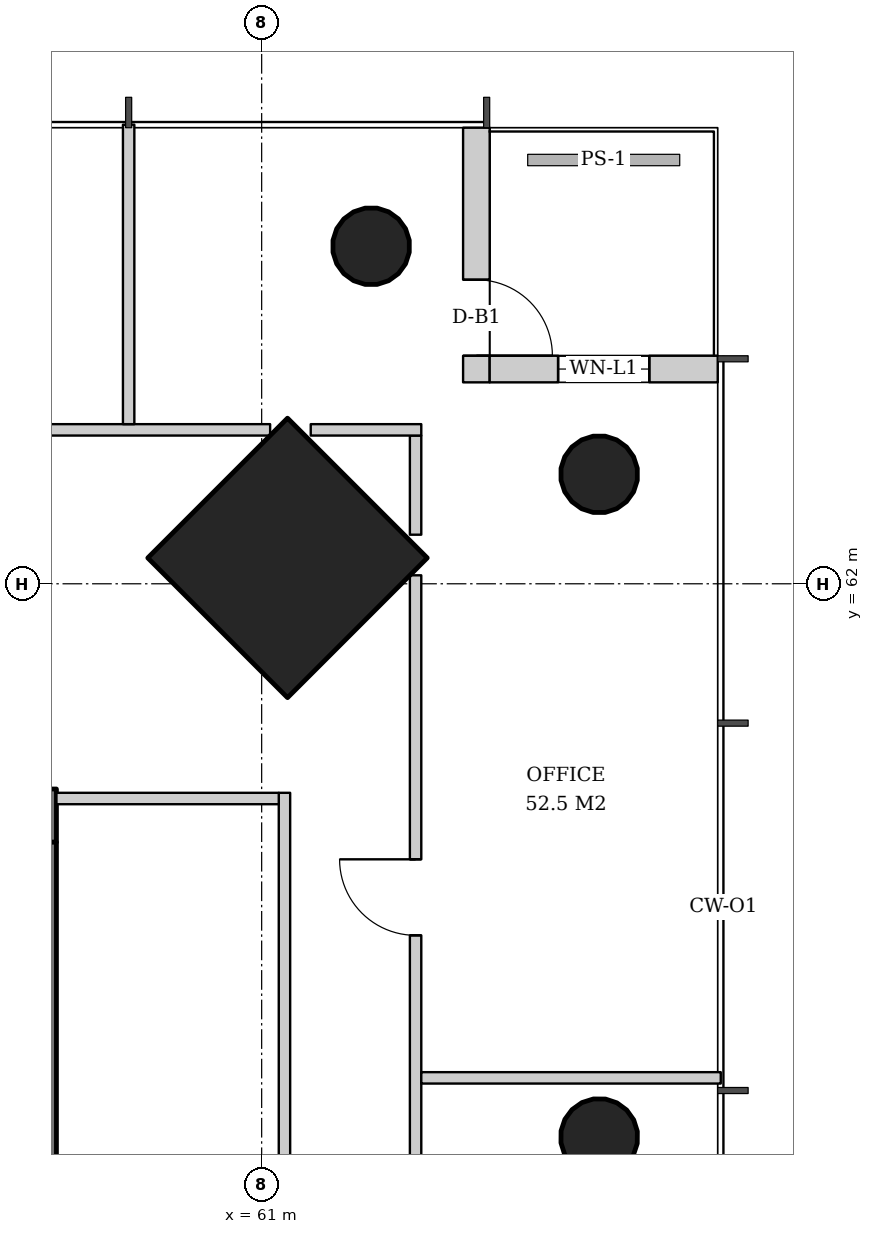
"""IFC4 building model, lengths in metres.
Left out: names, types, materials, properties, quantities, classifications, styles, units other than length and angle.
Written with IfcOpenShell. Run it as: python <this file> out.ifc"""

import sys

from ifc_helpers import new_model, si_unit, direction, frame, frame_2d, origin, origin_2d, place, context, subcontext, project, spatial, rectangle, hollow_circle, extrude, element, fill, save


model = new_model("IFC4")
c1 = context("Model", 3, precision=1e-05, world=origin(), true_north=direction((0.0, 1.0)))
c2 = subcontext(c1, "Body", "Model", "MODEL_VIEW")
j1 = project(units=[si_unit("LENGTHUNIT", "METRE"), si_unit("PLANEANGLEUNIT", "RADIAN")], contexts=[c1])
p1 = place(None, origin())
s1 = spatial("IfcSite", under=j1, at=p1, CompositionType="ELEMENT")
p2 = place(p1, origin())
s2 = spatial("IfcBuilding", under=s1, at=p2, CompositionType="ELEMENT")
p3 = place(p2, frame((0.0, 0.0, 131.2)))
s3 = spatial("IfcBuildingStorey", under=s2, at=p3, CompositionType="ELEMENT", Elevation=131.2)
p4 = place(p3, frame((61.379, 62.379, 0.0), z_axis=(-0.031962158256, -0.031962158256, 0.998977898093), x_axis=(0.707106781187, -0.707106781187, 0.0)))
e1 = element("IfcColumn", 1, at=p4, inside=s3, PredefinedType="COLUMN", context=c2, shape_type="SweptSolid", body=[
    extrude(rectangle(XDim=2.6, YDim=2.6, at=origin_2d()), origin(), (0.0, 0.0, 1.0), 3.804),
])
p5 = place(p3, frame((65.479, 63.479, 0.0), z_axis=(-0.031898107953, -0.031898107953, 0.998981992539), x_axis=(0.707106781187, -0.707106781187, 0.0)))
e2 = element("IfcColumn", 2, at=p5, inside=s3, PredefinedType="COLUMN", context=c2, shape_type="SweptSolid", body=[
    extrude(hollow_circle(Radius=0.508, WallThickness=0.04, at=origin_2d()), origin(), (0.0, 0.0, 1.0), 3.804),
])
p6 = place(p3, frame((65.479, 54.739, 0.0), z_axis=(-0.031910269556, -0.015987237665, 0.999362868496), x_axis=(0.447933021895, -0.894067115991, 0.0)))
e3 = element("IfcColumn", 3, at=p6, inside=s3, PredefinedType="COLUMN", context=c2, shape_type="SweptSolid", body=[
    extrude(hollow_circle(Radius=0.508, WallThickness=0.04, at=origin_2d()), origin(), (0.0, 0.0, 1.0), 3.802),
])
p7 = place(p3, frame((62.479, 66.479, 0.0), z_axis=(-0.031898107953, -0.031898107953, 0.998981992539), x_axis=(0.707106781187, -0.707106781187, 0.0)))
e4 = element("IfcColumn", 4, at=p7, inside=s3, PredefinedType="COLUMN", context=c2, shape_type="SweptSolid", body=[
    extrude(hollow_circle(Radius=0.508, WallThickness=0.04, at=origin_2d()), origin(), (0.0, 0.0, 1.0), 3.804),
])
p8 = place(p3, frame((31.7, 58.95, 0.0), z_axis=(0.0, 0.0, 1.0), x_axis=(1.0, 0.0, 0.0)))
e5 = element("IfcWall", 5, at=p8, inside=s3, PredefinedType="SHEAR", context=c2, shape_type="SweptSolid", body=[
    extrude(rectangle(XDim=26.6, YDim=0.7, at=frame_2d((13.3, 0.0))), origin(), (0.0, 0.0, 1.0), 3.8),
])
p9 = place(p8, frame((17.94, 0.0, 0.0)))
e6 = element("IfcOpeningElement", 6, at=p9, cuts=e5, PredefinedType="OPENING", context=c2, shape_type="SweptSolid", body=[
    extrude(rectangle(XDim=1.0, YDim=2.1, at=frame_2d((0.5, 1.05))), frame((0.0, 0.36, 0.0), z_axis=(0.0, -1.0, 0.0), x_axis=(1.0, 0.0, 0.0)), (0.0, 0.0, 1.0), 0.72),
])
p10 = place(p8, frame((5.825, 0.0, 0.0)))
e7 = element("IfcOpeningElement", 7, at=p10, cuts=e5, PredefinedType="OPENING", context=c2, shape_type="SweptSolid", body=[
    extrude(rectangle(XDim=1.0, YDim=2.1, at=frame_2d((0.5, 1.05))), frame((0.0, 0.36, 0.0), z_axis=(0.0, -1.0, 0.0), x_axis=(1.0, 0.0, 0.0)), (0.0, 0.0, 1.0), 0.72),
])
p11 = place(p8, frame((1.169, 0.0, 0.0)))
e8 = element("IfcOpeningElement", 8, at=p11, cuts=e5, PredefinedType="OPENING", context=c2, shape_type="SweptSolid", body=[
    extrude(rectangle(XDim=1.0, YDim=2.1, at=frame_2d((0.5, 1.05))), frame((0.0, 0.36, 0.0), z_axis=(0.0, -1.0, 0.0), x_axis=(1.0, 0.0, 0.0)), (0.0, 0.0, 1.0), 0.72),
])
p12 = place(p8, frame((3.447, 0.0, 0.0)))
e9 = element("IfcOpeningElement", 9, at=p12, cuts=e5, PredefinedType="OPENING", context=c2, shape_type="SweptSolid", body=[
    extrude(rectangle(XDim=1.0, YDim=2.1, at=frame_2d((0.5, 1.05))), frame((0.0, 0.36, 0.0), z_axis=(0.0, -1.0, 0.0), x_axis=(1.0, 0.0, 0.0)), (0.0, 0.0, 1.0), 0.72),
])
p13 = place(p8, frame((8.342, 0.0, 0.0)))
e10 = element("IfcOpeningElement", 10, at=p13, cuts=e5, PredefinedType="OPENING", context=c2, shape_type="SweptSolid", body=[
    extrude(rectangle(XDim=1.0, YDim=2.1, at=frame_2d((0.5, 1.05))), frame((0.0, 0.36, 0.0), z_axis=(0.0, -1.0, 0.0), x_axis=(1.0, 0.0, 0.0)), (0.0, 0.0, 1.0), 0.72),
])
p14 = place(p8, frame((11.626, 0.0, 0.0)))
e11 = element("IfcOpeningElement", 11, at=p14, cuts=e5, PredefinedType="OPENING", context=c2, shape_type="SweptSolid", body=[
    extrude(rectangle(XDim=1.0, YDim=2.1, at=frame_2d((0.5, 1.05))), frame((0.0, 0.36, 0.0), z_axis=(0.0, -1.0, 0.0), x_axis=(1.0, 0.0, 0.0)), (0.0, 0.0, 1.0), 0.72),
])
p15 = place(p8, frame((14.862, 0.0, 0.0)))
e12 = element("IfcOpeningElement", 12, at=p15, cuts=e5, PredefinedType="OPENING", context=c2, shape_type="SweptSolid", body=[
    extrude(rectangle(XDim=1.0, YDim=2.1, at=frame_2d((0.5, 1.05))), frame((0.0, 0.36, 0.0), z_axis=(0.0, -1.0, 0.0), x_axis=(1.0, 0.0, 0.0)), (0.0, 0.0, 1.0), 0.72),
])
p16 = place(p8, frame((20.9, 0.0, 0.0)))
e13 = element("IfcOpeningElement", 13, at=p16, cuts=e5, PredefinedType="OPENING", context=c2, shape_type="SweptSolid", body=[
    extrude(rectangle(XDim=1.0, YDim=2.1, at=frame_2d((0.5, 1.05))), frame((0.0, 0.36, 0.0), z_axis=(0.0, -1.0, 0.0), x_axis=(1.0, 0.0, 0.0)), (0.0, 0.0, 1.0), 0.72),
])
p17 = place(p8, frame((23.75, 0.0, 0.0)))
e14 = element("IfcOpeningElement", 14, at=p17, cuts=e5, PredefinedType="OPENING", context=c2, shape_type="SweptSolid", body=[
    extrude(rectangle(XDim=1.0, YDim=2.1, at=frame_2d((0.5, 1.05))), frame((0.0, 0.36, 0.0), z_axis=(0.0, -1.0, 0.0), x_axis=(1.0, 0.0, 0.0)), (0.0, 0.0, 1.0), 0.72),
])
p18 = place(p3, frame((57.95, 33.4, 0.0), z_axis=(0.0, 0.0, 1.0), x_axis=(0.0, 1.0, 0.0)))
e15 = element("IfcWall", 15, at=p18, inside=s3, PredefinedType="SHEAR", context=c2, shape_type="SweptSolid", body=[
    extrude(rectangle(XDim=25.2, YDim=0.7, at=frame_2d((12.6, 0.0))), origin(), (0.0, 0.0, 1.0), 3.8),
])
p19 = place(p18, frame((11.7, 0.0, 0.0)))
e16 = element("IfcOpeningElement", 16, at=p19, cuts=e15, PredefinedType="OPENING", context=c2, shape_type="SweptSolid", body=[
    extrude(rectangle(XDim=1.8, YDim=2.4, at=frame_2d((0.9, 1.2))), frame((0.0, 0.36, 0.0), z_axis=(0.0, -1.0, 0.0), x_axis=(1.0, 0.0, 0.0)), (0.0, 0.0, 1.0), 0.72),
])
p20 = place(p3, frame((63.825, 68.0, 0.0), z_axis=(0.0, 0.0, 1.0), x_axis=(0.0, -1.0, 0.0)))
e17 = element("IfcWall", 17, at=p20, inside=s3, PredefinedType="SOLIDWALL", context=c2, shape_type="SweptSolid", body=[
    extrude(rectangle(XDim=3.35, YDim=0.35, at=frame_2d((1.675, 0.0))), origin(), (0.0, 0.0, 1.0), 3.62),
])
p21 = place(p20, frame((2.0, 0.0, 0.0)))
e18 = element("IfcOpeningElement", 18, at=p21, cuts=e17, PredefinedType="OPENING", context=c2, shape_type="SweptSolid", body=[
    extrude(rectangle(XDim=1.0, YDim=2.4, at=frame_2d((0.5, 1.2))), frame((0.0, 0.185, 0.0), z_axis=(0.0, -1.0, 0.0), x_axis=(1.0, 0.0, 0.0)), (0.0, 0.0, 1.0), 0.37),
])
p22 = place(p3, frame((64.0, 64.825, 0.0), z_axis=(0.0, 0.0, 1.0), x_axis=(1.0, 0.0, 0.0)))
e19 = element("IfcWall", 19, at=p22, inside=s3, PredefinedType="SOLIDWALL", context=c2, shape_type="SweptSolid", body=[
    extrude(rectangle(XDim=3.0, YDim=0.35, at=frame_2d((1.5, 0.0))), origin(), (0.0, 0.0, 1.0), 3.62),
])
p23 = place(p22, frame((0.9, 0.0, 0.6)))
e20 = element("IfcOpeningElement", 20, at=p23, cuts=e19, PredefinedType="OPENING", context=c2, shape_type="SweptSolid", body=[
    extrude(rectangle(XDim=1.2, YDim=2.55, at=frame_2d((0.6, 1.275))), frame((0.0, 0.185, 0.0), z_axis=(0.0, -1.0, 0.0), x_axis=(1.0, 0.0, 0.0)), (0.0, 0.0, 1.0), 0.37),
])
p24 = place(p3, frame((61.3, 48.025, 0.0), z_axis=(0.0, 0.0, 1.0), x_axis=(0.0, 1.0, 0.0)))
e21 = element("IfcWall", 21, at=p24, inside=s3, PredefinedType="PARTITIONING", context=c2, shape_type="SweptSolid", body=[
    extrude(rectangle(XDim=11.225, YDim=0.15, at=frame_2d((5.613, 0.0))), origin(), (0.0, 0.0, 1.0), 2.806),
])
p25 = place(p24, frame((5.113, 0.0, 0.0)))
e22 = element("IfcOpeningElement", 22, at=p25, cuts=e21, PredefinedType="OPENING", context=c2, shape_type="SweptSolid", body=[
    extrude(rectangle(XDim=1.0, YDim=2.1, at=frame_2d((0.5, 1.05))), frame((0.0, 0.085, 0.0), z_axis=(0.0, -1.0, 0.0), x_axis=(1.0, 0.0, 0.0)), (0.0, 0.0, 1.0), 0.17),
])
p26 = place(p3, frame((58.3, 59.175, 0.0), z_axis=(0.0, 0.0, 1.0), x_axis=(1.0, 0.0, 0.0)))
e23 = element("IfcWall", 23, at=p26, inside=s3, PredefinedType="PARTITIONING", context=c2, shape_type="SweptSolid", body=[
    extrude(rectangle(XDim=2.925, YDim=0.15, at=frame_2d((1.462, 0.0))), origin(), (0.0, 0.0, 1.0), 3.62),
])
p27 = place(p3, frame((63.025, 29.888, 0.0), z_axis=(0.0, 0.0, 1.0), x_axis=(0.0, 1.0, 0.0)))
e24 = element("IfcWall", 24, at=p27, inside=s3, PredefinedType="PARTITIONING", context=c2, shape_type="SweptSolid", body=[
    extrude(rectangle(XDim=32.223, YDim=0.15, at=frame_2d((16.112, 0.0))), origin(), (0.0, 0.0, 1.0), 2.72),
])
p28 = place(p27, frame((3.737, 0.0, 0.0)))
e25 = element("IfcOpeningElement", 25, at=p28, cuts=e24, PredefinedType="OPENING", context=c2, shape_type="SweptSolid", body=[
    extrude(rectangle(XDim=1.0, YDim=2.1, at=frame_2d((0.5, 1.05))), frame((0.0, 0.085, 0.0), z_axis=(0.0, -1.0, 0.0), x_axis=(1.0, 0.0, 0.0)), (0.0, 0.0, 1.0), 0.17),
])
p29 = place(p27, frame((8.487, 0.0, 0.0)))
e26 = element("IfcOpeningElement", 26, at=p29, cuts=e24, PredefinedType="OPENING", context=c2, shape_type="SweptSolid", body=[
    extrude(rectangle(XDim=1.0, YDim=2.1, at=frame_2d((0.5, 1.05))), frame((0.0, 0.085, 0.0), z_axis=(0.0, -1.0, 0.0), x_axis=(1.0, 0.0, 0.0)), (0.0, 0.0, 1.0), 0.17),
])
p30 = place(p27, frame((14.937, 0.0, 0.0)))
e27 = element("IfcOpeningElement", 27, at=p30, cuts=e24, PredefinedType="OPENING", context=c2, shape_type="SweptSolid", body=[
    extrude(rectangle(XDim=1.8, YDim=2.4, at=frame_2d((0.9, 1.2))), frame((0.0, 0.085, 0.0), z_axis=(0.0, -1.0, 0.0), x_axis=(1.0, 0.0, 0.0)), (0.0, 0.0, 1.0), 0.17),
])
p31 = place(p27, frame((20.437, 0.0, 0.0)))
e28 = element("IfcOpeningElement", 28, at=p31, cuts=e24, PredefinedType="OPENING", context=c2, shape_type="SweptSolid", body=[
    extrude(rectangle(XDim=1.0, YDim=2.1, at=frame_2d((0.5, 1.05))), frame((0.0, 0.085, 0.0), z_axis=(0.0, -1.0, 0.0), x_axis=(1.0, 0.0, 0.0)), (0.0, 0.0, 1.0), 0.17),
])
p32 = place(p27, frame((27.487, 0.0, 0.0)))
e29 = element("IfcOpeningElement", 29, at=p32, cuts=e24, PredefinedType="OPENING", context=c2, shape_type="SweptSolid", body=[
    extrude(rectangle(XDim=1.0, YDim=2.1, at=frame_2d((0.5, 1.05))), frame((0.0, 0.085, 0.0), z_axis=(0.0, -1.0, 0.0), x_axis=(1.0, 0.0, 0.0)), (0.0, 0.0, 1.0), 0.17),
])
p33 = place(p3, frame((63.025, 62.646, 0.0), z_axis=(0.0, 0.0, 1.0), x_axis=(0.0, 1.0, 0.0)))
e30 = element("IfcWall", 30, at=p33, inside=s3, PredefinedType="PARTITIONING", context=c2, shape_type="SweptSolid", body=[
    extrude(rectangle(XDim=1.304, YDim=0.15, at=frame_2d((0.652, 0.0))), origin(), (0.0, 0.0, 1.0), 3.07),
])
p34 = place(p3, frame((63.1, 55.5, 0.0), z_axis=(0.0, 0.0, 1.0), x_axis=(1.0, 0.0, 0.0)))
e31 = element("IfcWall", 31, at=p34, inside=s3, PredefinedType="PARTITIONING", context=c2, shape_type="SweptSolid", body=[
    extrude(rectangle(XDim=3.94, YDim=0.15, at=frame_2d((1.97, 0.0))), origin(), (0.0, 0.0, 1.0), 2.82),
])
p35 = place(p3, frame((63.1, 64.025, 0.0), z_axis=(0.0, 0.0, 1.0), x_axis=(-1.0, 0.0, 0.0)))
e32 = element("IfcWall", 32, at=p35, inside=s3, PredefinedType="PARTITIONING", context=c2, shape_type="SweptSolid", body=[
    extrude(rectangle(XDim=1.455, YDim=0.15, at=frame_2d((0.727, 0.0))), origin(), (0.0, 0.0, 1.0), 3.07),
])
p36 = place(p3, frame((61.112, 64.025, 0.0), z_axis=(0.0, 0.0, 1.0), x_axis=(-1.0, 0.0, 0.0)))
e33 = element("IfcWall", 33, at=p36, inside=s3, PredefinedType="PARTITIONING", context=c2, shape_type="SweptSolid", body=[
    extrude(rectangle(XDim=32.223, YDim=0.15, at=frame_2d((16.112, 0.0))), origin(), (0.0, 0.0, 1.0), 2.72),
])
p37 = place(p36, frame((3.737, 0.0, 0.0)))
e34 = element("IfcOpeningElement", 34, at=p37, cuts=e33, PredefinedType="OPENING", context=c2, shape_type="SweptSolid", body=[
    extrude(rectangle(XDim=1.0, YDim=2.1, at=frame_2d((0.5, 1.05))), frame((0.0, 0.085, 0.0), z_axis=(0.0, -1.0, 0.0), x_axis=(1.0, 0.0, 0.0)), (0.0, 0.0, 1.0), 0.17),
])
p38 = place(p36, frame((8.487, 0.0, 0.0)))
e35 = element("IfcOpeningElement", 35, at=p38, cuts=e33, PredefinedType="OPENING", context=c2, shape_type="SweptSolid", body=[
    extrude(rectangle(XDim=1.0, YDim=2.1, at=frame_2d((0.5, 1.05))), frame((0.0, 0.085, 0.0), z_axis=(0.0, -1.0, 0.0), x_axis=(1.0, 0.0, 0.0)), (0.0, 0.0, 1.0), 0.17),
])
p39 = place(p36, frame((13.237, 0.0, 0.0)))
e36 = element("IfcOpeningElement", 36, at=p39, cuts=e33, PredefinedType="OPENING", context=c2, shape_type="SweptSolid", body=[
    extrude(rectangle(XDim=1.0, YDim=2.1, at=frame_2d((0.5, 1.05))), frame((0.0, 0.085, 0.0), z_axis=(0.0, -1.0, 0.0), x_axis=(1.0, 0.0, 0.0)), (0.0, 0.0, 1.0), 0.17),
])
p40 = place(p36, frame((17.987, 0.0, 0.0)))
e37 = element("IfcOpeningElement", 37, at=p40, cuts=e33, PredefinedType="OPENING", context=c2, shape_type="SweptSolid", body=[
    extrude(rectangle(XDim=1.0, YDim=2.1, at=frame_2d((0.5, 1.05))), frame((0.0, 0.085, 0.0), z_axis=(0.0, -1.0, 0.0), x_axis=(1.0, 0.0, 0.0)), (0.0, 0.0, 1.0), 0.17),
])
p41 = place(p36, frame((22.737, 0.0, 0.0)))
e38 = element("IfcOpeningElement", 38, at=p41, cuts=e33, PredefinedType="OPENING", context=c2, shape_type="SweptSolid", body=[
    extrude(rectangle(XDim=1.0, YDim=2.1, at=frame_2d((0.5, 1.05))), frame((0.0, 0.085, 0.0), z_axis=(0.0, -1.0, 0.0), x_axis=(1.0, 0.0, 0.0)), (0.0, 0.0, 1.0), 0.17),
])
p42 = place(p36, frame((27.487, 0.0, 0.0)))
e39 = element("IfcOpeningElement", 39, at=p42, cuts=e33, PredefinedType="OPENING", context=c2, shape_type="SweptSolid", body=[
    extrude(rectangle(XDim=1.0, YDim=2.1, at=frame_2d((0.5, 1.05))), frame((0.0, 0.085, 0.0), z_axis=(0.0, -1.0, 0.0), x_axis=(1.0, 0.0, 0.0)), (0.0, 0.0, 1.0), 0.17),
])
p43 = place(p3, frame((59.25, 64.1, 0.0), z_axis=(0.0, 0.0, 1.0), x_axis=(0.0, 1.0, 0.0)))
e40 = element("IfcWall", 40, at=p43, inside=s3, PredefinedType="PARTITIONING", context=c2, shape_type="SweptSolid", body=[
    extrude(rectangle(XDim=3.94, YDim=0.15, at=frame_2d((1.97, 0.0))), origin(), (0.0, 0.0, 1.0), 2.82),
])
p44 = place(p21, origin())
e41 = element("IfcDoor", 41, at=p44, inside=s3, OperationType="SINGLE_SWING_RIGHT", PredefinedType="DOOR", context=c2, shape_type="SweptSolid", body=[
    extrude(rectangle(XDim=1.0, YDim=2.4, at=frame_2d((0.5, 1.2))), frame((0.0, 0.025, 0.0), z_axis=(0.0, -1.0, 0.0), x_axis=(1.0, 0.0, 0.0)), (0.0, 0.0, 1.0), 0.05),
])
fill(e18, e41)
p45 = place(p23, origin())
e42 = element("IfcWindow", 42, at=p45, inside=s3, PartitioningType="SINGLE_PANEL", PredefinedType="WINDOW", context=c2, shape_type="SweptSolid", body=[
    extrude(rectangle(XDim=1.2, YDim=2.55, at=frame_2d((0.6, 1.275))), frame((0.0, 0.03, 0.0), z_axis=(0.0, -1.0, 0.0), x_axis=(1.0, 0.0, 0.0)), (0.0, 0.0, 1.0), 0.06),
])
fill(e20, e42)
p46 = place(p32, origin())
e43 = element("IfcDoor", 43, at=p46, inside=s3, OperationType="SINGLE_SWING_RIGHT", PredefinedType="DOOR", context=c2, shape_type="SweptSolid", body=[
    extrude(rectangle(XDim=1.0, YDim=2.1, at=frame_2d((0.5, 1.05))), frame((0.0, 0.025, 0.0), z_axis=(0.0, -1.0, 0.0), x_axis=(1.0, 0.0, 0.0)), (0.0, 0.0, 1.0), 0.05),
])
fill(e29, e43)
save(model, sys.argv[1])
